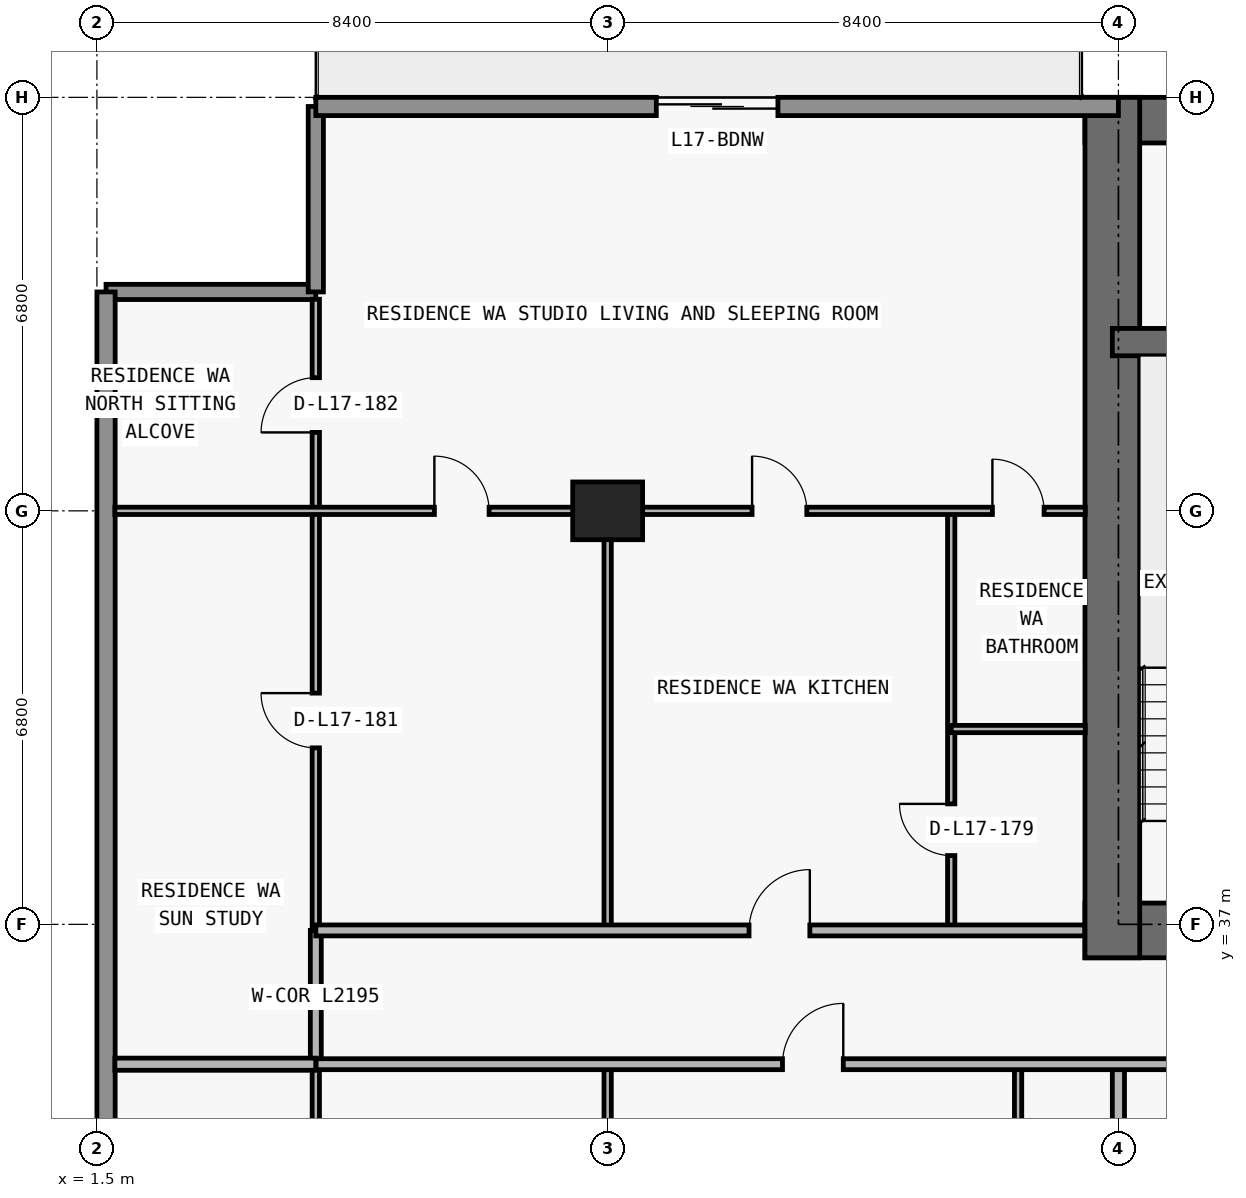
"""IFC4 building model, lengths in metres.
Left out: names, types, materials, properties, quantities, classifications, styles, units other than length and angle.
Written with IfcOpenShell. Run it as: python <this file> out.ifc"""

import sys

from ifc_helpers import new_model, si_unit, direction, frame, frame_2d, origin, origin_2d, place, context, subcontext, project, spatial, rectangle, extrude, element, fill, save


model = new_model("IFC4")
c1 = context("Model", 3, precision=1e-05, world=origin(), true_north=direction((0.0, 1.0)))
c2 = subcontext(c1, "Body", "Model", "MODEL_VIEW")
j1 = project(units=[si_unit("LENGTHUNIT", "METRE"), si_unit("PLANEANGLEUNIT", "RADIAN")], contexts=[c1])
p1 = place(None, origin())
s1 = spatial("IfcSite", under=j1, at=p1, CompositionType="ELEMENT")
p2 = place(p1, origin())
s2 = spatial("IfcBuilding", under=s1, at=p2, CompositionType="ELEMENT")
p3 = place(p2, frame((0.0, 0.0, 66.3)))
s3 = spatial("IfcBuildingStorey", under=s2, at=p3, CompositionType="ELEMENT", Elevation=66.3)
p4 = place(p3, frame((9.9, 43.8, 0.0), z_axis=(0.0, 0.0, 1.0), x_axis=(1.0, 0.0, 0.0)))
e1 = element("IfcColumn", 1, at=p4, inside=s3, PredefinedType="COLUMN", context=c2, shape_type="SweptSolid", body=[
    extrude(rectangle(XDim=1.15, YDim=0.95, at=origin_2d()), origin(), (0.0, 0.0, 1.0), 3.05),
])
p5 = place(p3, frame((17.75, 36.9, 0.0), z_axis=(0.0, 0.0, 1.0), x_axis=(1.0, 0.0, 0.0)))
e2 = element("IfcWall", 2, at=p5, inside=s3, PredefinedType="SHEAR", context=c2, shape_type="SweptSolid", body=[
    extrude(rectangle(XDim=42.3, YDim=0.9, at=frame_2d((21.15, 0.0))), origin(), (0.0, 0.0, 1.0), 3.05),
])
p6 = place(p5, frame((14.55, 0.0, 0.0)))
e3 = element("IfcOpeningElement", 3, at=p6, cuts=e2, PredefinedType="OPENING", context=c2, shape_type="SweptSolid", body=[
    extrude(rectangle(XDim=1.1, YDim=2.15, at=frame_2d((0.55, 1.075))), frame((0.0, 0.46, 0.0), z_axis=(0.0, -1.0, 0.0), x_axis=(1.0, 0.0, 0.0)), (0.0, 0.0, 1.0), 0.92),
])
p7 = place(p5, frame((6.4, 0.0, 0.0)))
e4 = element("IfcOpeningElement", 4, at=p7, cuts=e2, PredefinedType="OPENING", context=c2, shape_type="SweptSolid", body=[
    extrude(rectangle(XDim=1.05, YDim=2.15, at=frame_2d((0.525, 1.075))), frame((0.0, 0.46, 0.0), z_axis=(0.0, -1.0, 0.0), x_axis=(1.0, 0.0, 0.0)), (0.0, 0.0, 1.0), 0.92),
])
p8 = place(p5, frame((34.9, 0.0, 0.0)))
e5 = element("IfcOpeningElement", 5, at=p8, cuts=e2, PredefinedType="OPENING", context=c2, shape_type="SweptSolid", body=[
    extrude(rectangle(XDim=1.05, YDim=2.15, at=frame_2d((0.525, 1.075))), frame((0.0, 0.46, 0.0), z_axis=(0.0, -1.0, 0.0), x_axis=(1.0, 0.0, 0.0)), (0.0, 0.0, 1.0), 0.92),
])
p9 = place(p5, frame((11.012, 0.0, 0.0)))
e6 = element("IfcOpeningElement", 6, at=p9, cuts=e2, PredefinedType="OPENING", context=c2, shape_type="SweptSolid", body=[
    extrude(rectangle(XDim=1.05, YDim=2.15, at=frame_2d((0.525, 1.075))), frame((0.0, 0.46, 0.0), z_axis=(0.0, -1.0, 0.0), x_axis=(1.0, 0.0, 0.0)), (0.0, 0.0, 1.0), 0.92),
])
p10 = place(p5, frame((24.25, 0.0, 0.0)))
e7 = element("IfcOpeningElement", 7, at=p10, cuts=e2, PredefinedType="OPENING", context=c2, shape_type="SweptSolid", body=[
    extrude(rectangle(XDim=1.05, YDim=2.15, at=frame_2d((0.525, 1.075))), frame((0.0, 0.46, 0.0), z_axis=(0.0, -1.0, 0.0), x_axis=(1.0, 0.0, 0.0)), (0.0, 0.0, 1.0), 0.92),
])
p11 = place(p3, frame((17.75, 50.225, 0.0), z_axis=(0.0, 0.0, 1.0), x_axis=(1.0, 0.0, 0.0)))
e8 = element("IfcWall", 8, at=p11, inside=s3, PredefinedType="SHEAR", context=c2, shape_type="SweptSolid", body=[
    extrude(rectangle(XDim=42.3, YDim=0.75, at=frame_2d((21.15, 0.0))), origin(), (0.0, 0.0, 1.0), 3.05),
])
p12 = place(p3, frame((18.2, 36.45, 0.0), z_axis=(0.0, 0.0, 1.0), x_axis=(0.0, 1.0, 0.0)))
e9 = element("IfcWall", 9, at=p12, inside=s3, PredefinedType="SHEAR", context=c2, shape_type="SweptSolid", body=[
    extrude(rectangle(XDim=14.15, YDim=0.9, at=frame_2d((7.075, 0.0))), origin(), (0.0, 0.0, 1.0), 3.05),
])
p13 = place(p3, frame((18.2, 46.575, 0.0), z_axis=(0.0, 0.0, 1.0), x_axis=(1.0, 0.0, 0.0)))
e10 = element("IfcWall", 10, at=p13, inside=s3, PredefinedType="SHEAR", context=c2, shape_type="SweptSolid", body=[
    extrude(rectangle(XDim=41.4, YDim=0.45, at=frame_2d((20.7, 0.0))), origin(), (0.0, 0.0, 1.0), 3.05),
])
p14 = place(p13, frame((7.675, 0.0, 0.0)))
e11 = element("IfcOpeningElement", 11, at=p14, cuts=e10, PredefinedType="OPENING", context=c2, shape_type="SweptSolid", body=[
    extrude(rectangle(XDim=1.05, YDim=2.15, at=frame_2d((0.525, 1.075))), frame((0.0, 0.235, 0.0), z_axis=(0.0, -1.0, 0.0), x_axis=(1.0, 0.0, 0.0)), (0.0, 0.0, 1.0), 0.47),
])
p15 = place(p13, frame((32.725, 0.0, 0.0)))
e12 = element("IfcOpeningElement", 12, at=p15, cuts=e10, PredefinedType="OPENING", context=c2, shape_type="SweptSolid", body=[
    extrude(rectangle(XDim=1.05, YDim=2.15, at=frame_2d((0.525, 1.075))), frame((0.0, 0.235, 0.0), z_axis=(0.0, -1.0, 0.0), x_axis=(1.0, 0.0, 0.0)), (0.0, 0.0, 1.0), 0.47),
])
p16 = place(p3, frame((1.65, 47.4, 0.0), z_axis=(0.0, 0.0, 1.0), x_axis=(1.0, 0.0, 0.0)))
e13 = element("IfcWall", 13, at=p16, inside=s3, PredefinedType="ELEMENTEDWALL", context=c2, shape_type="SweptSolid", body=[
    extrude(rectangle(XDim=3.45, YDim=0.25, at=frame_2d((1.725, 0.0))), origin(), (0.0, 0.0, 1.0), 3.05),
])
p17 = place(p3, frame((5.1, 47.4, 0.0), z_axis=(0.0, 0.0, 1.0), x_axis=(0.0, 1.0, 0.0)))
e14 = element("IfcWall", 14, at=p17, inside=s3, PredefinedType="ELEMENTEDWALL", context=c2, shape_type="SweptSolid", body=[
    extrude(rectangle(XDim=3.05, YDim=0.25, at=frame_2d((1.525, 0.0))), origin(), (0.0, 0.0, 1.0), 3.05),
])
p18 = place(p3, frame((1.65, 26.8, 0.0), z_axis=(0.0, 0.0, 1.0), x_axis=(0.0, 1.0, 0.0)))
e15 = element("IfcWall", 15, at=p18, inside=s3, PredefinedType="STANDARD", context=c2, shape_type="SweptSolid", body=[
    extrude(rectangle(XDim=20.6, YDim=0.3, at=frame_2d((10.3, 0.0))), origin(), (0.0, 0.0, 1.0), 3.05),
])
p19 = place(p3, frame((5.1, 50.45, 0.0), z_axis=(0.0, 0.0, 1.0), x_axis=(1.0, 0.0, 0.0)))
e16 = element("IfcWall", 16, at=p19, inside=s3, PredefinedType="STANDARD", context=c2, shape_type="SweptSolid", body=[
    extrude(rectangle(XDim=13.2, YDim=0.3, at=frame_2d((6.6, 0.0))), origin(), (0.0, 0.0, 1.0), 3.05),
])
p20 = place(p19, frame((5.6, 0.0, 0.0)))
e17 = element("IfcOpeningElement", 17, at=p20, cuts=e16, PredefinedType="OPENING", context=c2, shape_type="SweptSolid", body=[
    extrude(rectangle(XDim=2.0, YDim=2.3, at=frame_2d((1.0, 1.15))), frame((0.0, 0.16, 0.0), z_axis=(0.0, -1.0, 0.0), x_axis=(1.0, 0.0, 0.0)), (0.0, 0.0, 1.0), 0.32),
])
p21 = place(p3, frame((5.1, 26.44, 0.0), z_axis=(0.0, 0.0, 1.0), x_axis=(0.0, 1.0, 0.0)))
e18 = element("IfcWall", 18, at=p21, inside=s3, PredefinedType="PARTITIONING", context=c2, shape_type="SweptSolid", body=[
    extrude(rectangle(XDim=8.26, YDim=0.12, at=frame_2d((4.13, 0.0))), origin(), (0.0, 0.0, 1.0), 3.05),
])
p22 = place(p3, frame((5.1, 34.705, 0.0), z_axis=(0.0, 0.0, 1.0), x_axis=(0.0, 1.0, 0.0)))
e19 = element("IfcWall", 19, at=p22, inside=s3, PredefinedType="PARTITIONING", context=c2, shape_type="SweptSolid", body=[
    extrude(rectangle(XDim=2.195, YDim=0.18, at=frame_2d((1.097, 0.0))), origin(), (0.0, 0.0, 1.0), 3.05),
])
p23 = place(p3, frame((5.1, 36.905, 0.0), z_axis=(0.0, 0.0, 1.0), x_axis=(0.0, 1.0, 0.0)))
e20 = element("IfcWall", 20, at=p23, inside=s3, PredefinedType="PARTITIONING", context=c2, shape_type="SweptSolid", body=[
    extrude(rectangle(XDim=10.375, YDim=0.12, at=frame_2d((5.188, 0.0))), origin(), (0.0, 0.0, 1.0), 3.05),
])
p24 = place(p23, frame((2.998, 0.0, 0.0)))
e21 = element("IfcOpeningElement", 21, at=p24, cuts=e20, PredefinedType="OPENING", context=c2, shape_type="SweptSolid", body=[
    extrude(rectangle(XDim=0.9, YDim=2.15, at=frame_2d((0.45, 1.075))), frame((0.0, 0.07, 0.0), z_axis=(0.0, -1.0, 0.0), x_axis=(1.0, 0.0, 0.0)), (0.0, 0.0, 1.0), 0.14),
])
p25 = place(p23, frame((8.185, 0.0, 0.0)))
e22 = element("IfcOpeningElement", 22, at=p25, cuts=e20, PredefinedType="OPENING", context=c2, shape_type="SweptSolid", body=[
    extrude(rectangle(XDim=0.9, YDim=2.15, at=frame_2d((0.45, 1.075))), frame((0.0, 0.07, 0.0), z_axis=(0.0, -1.0, 0.0), x_axis=(1.0, 0.0, 0.0)), (0.0, 0.0, 1.0), 0.14),
])
p26 = place(p3, frame((9.9, 26.44, 0.0), z_axis=(0.0, 0.0, 1.0), x_axis=(0.0, 1.0, 0.0)))
e23 = element("IfcWall", 23, at=p26, inside=s3, PredefinedType="PARTITIONING", context=c2, shape_type="SweptSolid", body=[
    extrude(rectangle(XDim=8.26, YDim=0.12, at=frame_2d((4.13, 0.0))), origin(), (0.0, 0.0, 1.0), 2.11),
])
p27 = place(p3, frame((9.9, 36.9, 0.0), z_axis=(0.0, 0.0, 1.0), x_axis=(0.0, 1.0, 0.0)))
e24 = element("IfcWall", 24, at=p27, inside=s3, PredefinedType="PARTITIONING", context=c2, shape_type="SweptSolid", body=[
    extrude(rectangle(XDim=6.9, YDim=0.12, at=frame_2d((3.45, 0.0))), origin(), (0.0, 0.0, 1.0), 2.11),
])
p28 = place(p3, frame((15.55, 36.9, 0.0), z_axis=(0.0, 0.0, 1.0), x_axis=(0.0, 1.0, 0.0)))
e25 = element("IfcWall", 25, at=p28, inside=s3, PredefinedType="PARTITIONING", context=c2, shape_type="SweptSolid", body=[
    extrude(rectangle(XDim=6.9, YDim=0.12, at=frame_2d((3.45, 0.0))), origin(), (0.0, 0.0, 1.0), 3.05),
])
p29 = place(p28, frame((1.231, 0.0, 0.0)))
e26 = element("IfcOpeningElement", 26, at=p29, cuts=e25, PredefinedType="OPENING", context=c2, shape_type="SweptSolid", body=[
    extrude(rectangle(XDim=0.85, YDim=2.1, at=frame_2d((0.425, 1.05))), frame((0.0, 0.07, 0.0), z_axis=(0.0, -1.0, 0.0), x_axis=(1.0, 0.0, 0.0)), (0.0, 0.0, 1.0), 0.14),
])
p30 = place(p3, frame((16.65, 26.44, 0.0), z_axis=(0.0, 0.0, 1.0), x_axis=(0.0, 1.0, 0.0)))
e27 = element("IfcWall", 27, at=p30, inside=s3, PredefinedType="PARTITIONING", context=c2, shape_type="SweptSolid", body=[
    extrude(rectangle(XDim=8.26, YDim=0.12, at=frame_2d((4.13, 0.0))), origin(), (0.0, 0.0, 1.0), 3.05),
])
p31 = place(p30, frame((4.005, 0.0, 0.0)))
e28 = element("IfcOpeningElement", 28, at=p31, cuts=e27, PredefinedType="OPENING", context=c2, shape_type="SweptSolid", body=[
    extrude(rectangle(XDim=0.85, YDim=2.1, at=frame_2d((0.425, 1.05))), frame((0.0, 0.07, 0.0), z_axis=(0.0, -1.0, 0.0), x_axis=(1.0, 0.0, 0.0)), (0.0, 0.0, 1.0), 0.14),
])
p32 = place(p3, frame((18.3, 26.44, 0.0), z_axis=(0.0, 0.0, 1.0), x_axis=(0.0, 1.0, 0.0)))
e29 = element("IfcWall", 29, at=p32, inside=s3, PredefinedType="PARTITIONING", context=c2, shape_type="SweptSolid", body=[
    extrude(rectangle(XDim=8.26, YDim=0.2, at=frame_2d((4.13, 0.0))), origin(), (0.0, 0.0, 1.0), 2.11),
])
p33 = place(p3, frame((1.795, 34.7, 0.0), z_axis=(0.0, 0.0, 1.0), x_axis=(1.0, 0.0, 0.0)))
e30 = element("IfcWall", 30, at=p33, inside=s3, PredefinedType="PARTITIONING", context=c2, shape_type="SweptSolid", body=[
    extrude(rectangle(XDim=3.305, YDim=0.2, at=frame_2d((1.653, 0.0))), origin(), (0.0, 0.0, 1.0), 3.05),
])
p34 = place(p3, frame((5.105, 34.7, 0.0), z_axis=(0.0, 0.0, 1.0), x_axis=(1.0, 0.0, 0.0)))
e31 = element("IfcWall", 31, at=p34, inside=s3, PredefinedType="PARTITIONING", context=c2, shape_type="SweptSolid", body=[
    extrude(rectangle(XDim=21.545, YDim=0.18, at=frame_2d((10.772, 0.0))), origin(), (0.0, 0.0, 1.0), 3.05),
])
p35 = place(p34, frame((7.67, 0.0, 0.0)))
e32 = element("IfcOpeningElement", 32, at=p35, cuts=e31, PredefinedType="OPENING", context=c2, shape_type="SweptSolid", body=[
    extrude(rectangle(XDim=1.0, YDim=2.2, at=frame_2d((0.5, 1.1))), frame((0.0, 0.1, 0.0), z_axis=(0.0, -1.0, 0.0), x_axis=(1.0, 0.0, 0.0)), (0.0, 0.0, 1.0), 0.2),
])
p36 = place(p34, frame((16.07, 0.0, 0.0)))
e33 = element("IfcOpeningElement", 33, at=p36, cuts=e31, PredefinedType="OPENING", context=c2, shape_type="SweptSolid", body=[
    extrude(rectangle(XDim=1.0, YDim=2.2, at=frame_2d((0.5, 1.1))), frame((0.0, 0.1, 0.0), z_axis=(0.0, -1.0, 0.0), x_axis=(1.0, 0.0, 0.0)), (0.0, 0.0, 1.0), 0.2),
])
p37 = place(p3, frame((5.1, 36.9, 0.0), z_axis=(0.0, 0.0, 1.0), x_axis=(1.0, 0.0, 0.0)))
e34 = element("IfcWall", 34, at=p37, inside=s3, PredefinedType="PARTITIONING", context=c2, shape_type="SweptSolid", body=[
    extrude(rectangle(XDim=12.645, YDim=0.18, at=frame_2d((6.323, 0.0))), origin(), (0.0, 0.0, 1.0), 3.05),
])
p38 = place(p37, frame((7.125, 0.0, 0.0)))
e35 = element("IfcOpeningElement", 35, at=p38, cuts=e34, PredefinedType="OPENING", context=c2, shape_type="SweptSolid", body=[
    extrude(rectangle(XDim=1.0, YDim=2.2, at=frame_2d((0.5, 1.1))), frame((0.0, 0.1, 0.0), z_axis=(0.0, -1.0, 0.0), x_axis=(1.0, 0.0, 0.0)), (0.0, 0.0, 1.0), 0.2),
])
p39 = place(p3, frame((15.55, 40.212, 0.0), z_axis=(0.0, 0.0, 1.0), x_axis=(1.0, 0.0, 0.0)))
e36 = element("IfcWall", 36, at=p39, inside=s3, PredefinedType="PARTITIONING", context=c2, shape_type="SweptSolid", body=[
    extrude(rectangle(XDim=2.205, YDim=0.12, at=frame_2d((1.103, 0.0))), origin(), (0.0, 0.0, 1.0), 3.05),
])
p40 = place(p3, frame((1.795, 43.8, 0.0), z_axis=(0.0, 0.0, 1.0), x_axis=(1.0, 0.0, 0.0)))
e37 = element("IfcWall", 37, at=p40, inside=s3, PredefinedType="PARTITIONING", context=c2, shape_type="SweptSolid", body=[
    extrude(rectangle(XDim=15.96, YDim=0.12, at=frame_2d((7.98, 0.0))), origin(), (0.0, 0.0, 1.0), 2.339),
])
p41 = place(p40, frame((5.255, 0.0, 0.0)))
e38 = element("IfcOpeningElement", 38, at=p41, cuts=e37, PredefinedType="OPENING", context=c2, shape_type="SweptSolid", body=[
    extrude(rectangle(XDim=0.9, YDim=2.15, at=frame_2d((0.45, 1.075))), frame((0.0, 0.07, 0.0), z_axis=(0.0, -1.0, 0.0), x_axis=(1.0, 0.0, 0.0)), (0.0, 0.0, 1.0), 0.14),
])
p42 = place(p40, frame((10.48, 0.0, 0.0)))
e39 = element("IfcOpeningElement", 39, at=p42, cuts=e37, PredefinedType="OPENING", context=c2, shape_type="SweptSolid", body=[
    extrude(rectangle(XDim=0.9, YDim=2.15, at=frame_2d((0.45, 1.075))), frame((0.0, 0.07, 0.0), z_axis=(0.0, -1.0, 0.0), x_axis=(1.0, 0.0, 0.0)), (0.0, 0.0, 1.0), 0.14),
])
p43 = place(p40, frame((14.433, 0.0, 0.0)))
e40 = element("IfcOpeningElement", 40, at=p43, cuts=e37, PredefinedType="OPENING", context=c2, shape_type="SweptSolid", body=[
    extrude(rectangle(XDim=0.85, YDim=2.1, at=frame_2d((0.425, 1.05))), frame((0.0, 0.07, 0.0), z_axis=(0.0, -1.0, 0.0), x_axis=(1.0, 0.0, 0.0)), (0.0, 0.0, 1.0), 0.14),
])
p44 = place(p20, origin())
e41 = element("IfcDoor", 41, at=p44, inside=s3, OperationType="DOUBLE_DOOR_SLIDING", PredefinedType="DOOR", context=c2, shape_type="SweptSolid", body=[
    extrude(rectangle(XDim=2.0, YDim=2.3, at=frame_2d((1.0, 1.15))), frame((0.0, 0.025, 0.0), z_axis=(0.0, -1.0, 0.0), x_axis=(1.0, 0.0, 0.0)), (0.0, 0.0, 1.0), 0.05),
])
fill(e17, e41)
p45 = place(p35, origin())
e42 = element("IfcDoor", 42, at=p45, inside=s3, OperationType="SINGLE_SWING_RIGHT", PredefinedType="DOOR", context=c2, shape_type="SweptSolid", body=[
    extrude(rectangle(XDim=1.0, YDim=2.2, at=frame_2d((0.5, 1.1))), frame((0.0, 0.025, 0.0), z_axis=(0.0, -1.0, 0.0), x_axis=(1.0, 0.0, 0.0)), (0.0, 0.0, 1.0), 0.05),
])
fill(e32, e42)
p46 = place(p41, origin())
e43 = element("IfcDoor", 43, at=p46, inside=s3, OperationType="SINGLE_SWING_LEFT", PredefinedType="DOOR", context=c2, shape_type="SweptSolid", body=[
    extrude(rectangle(XDim=0.9, YDim=2.15, at=frame_2d((0.45, 1.075))), frame((0.0, 0.025, 0.0), z_axis=(0.0, -1.0, 0.0), x_axis=(1.0, 0.0, 0.0)), (0.0, 0.0, 1.0), 0.05),
])
fill(e38, e43)
p47 = place(p38, origin())
e44 = element("IfcDoor", 44, at=p47, inside=s3, OperationType="SINGLE_SWING_RIGHT", PredefinedType="DOOR", context=c2, shape_type="SweptSolid", body=[
    extrude(rectangle(XDim=1.0, YDim=2.2, at=frame_2d((0.5, 1.1))), frame((0.0, 0.025, 0.0), z_axis=(0.0, -1.0, 0.0), x_axis=(1.0, 0.0, 0.0)), (0.0, 0.0, 1.0), 0.05),
])
fill(e35, e44)
p48 = place(p42, origin())
e45 = element("IfcDoor", 45, at=p48, inside=s3, OperationType="SINGLE_SWING_LEFT", PredefinedType="DOOR", context=c2, shape_type="SweptSolid", body=[
    extrude(rectangle(XDim=0.9, YDim=2.15, at=frame_2d((0.45, 1.075))), frame((0.0, 0.025, 0.0), z_axis=(0.0, -1.0, 0.0), x_axis=(1.0, 0.0, 0.0)), (0.0, 0.0, 1.0), 0.05),
])
fill(e39, e45)
p49 = place(p29, origin())
e46 = element("IfcDoor", 46, at=p49, inside=s3, OperationType="SINGLE_SWING_RIGHT", PredefinedType="DOOR", context=c2, shape_type="SweptSolid", body=[
    extrude(rectangle(XDim=0.85, YDim=2.1, at=frame_2d((0.425, 1.05))), frame((0.0, 0.025, 0.0), z_axis=(0.0, -1.0, 0.0), x_axis=(1.0, 0.0, 0.0)), (0.0, 0.0, 1.0), 0.05),
])
fill(e26, e46)
p50 = place(p43, origin())
e47 = element("IfcDoor", 47, at=p50, inside=s3, OperationType="SINGLE_SWING_LEFT", PredefinedType="DOOR", context=c2, shape_type="SweptSolid", body=[
    extrude(rectangle(XDim=0.85, YDim=2.1, at=frame_2d((0.425, 1.05))), frame((0.0, 0.025, 0.0), z_axis=(0.0, -1.0, 0.0), x_axis=(1.0, 0.0, 0.0)), (0.0, 0.0, 1.0), 0.05),
])
fill(e40, e47)
p51 = place(p24, origin())
e48 = element("IfcDoor", 48, at=p51, inside=s3, OperationType="SINGLE_SWING_RIGHT", PredefinedType="DOOR", context=c2, shape_type="SweptSolid", body=[
    extrude(rectangle(XDim=0.9, YDim=2.15, at=frame_2d((0.45, 1.075))), frame((0.0, 0.025, 0.0), z_axis=(0.0, -1.0, 0.0), x_axis=(1.0, 0.0, 0.0)), (0.0, 0.0, 1.0), 0.05),
])
fill(e21, e48)
p52 = place(p25, origin())
e49 = element("IfcDoor", 49, at=p52, inside=s3, OperationType="SINGLE_SWING_LEFT", PredefinedType="DOOR", context=c2, shape_type="SweptSolid", body=[
    extrude(rectangle(XDim=0.9, YDim=2.15, at=frame_2d((0.45, 1.075))), frame((0.0, 0.025, 0.0), z_axis=(0.0, -1.0, 0.0), x_axis=(1.0, 0.0, 0.0)), (0.0, 0.0, 1.0), 0.05),
])
fill(e22, e49)
save(model, sys.argv[1])
